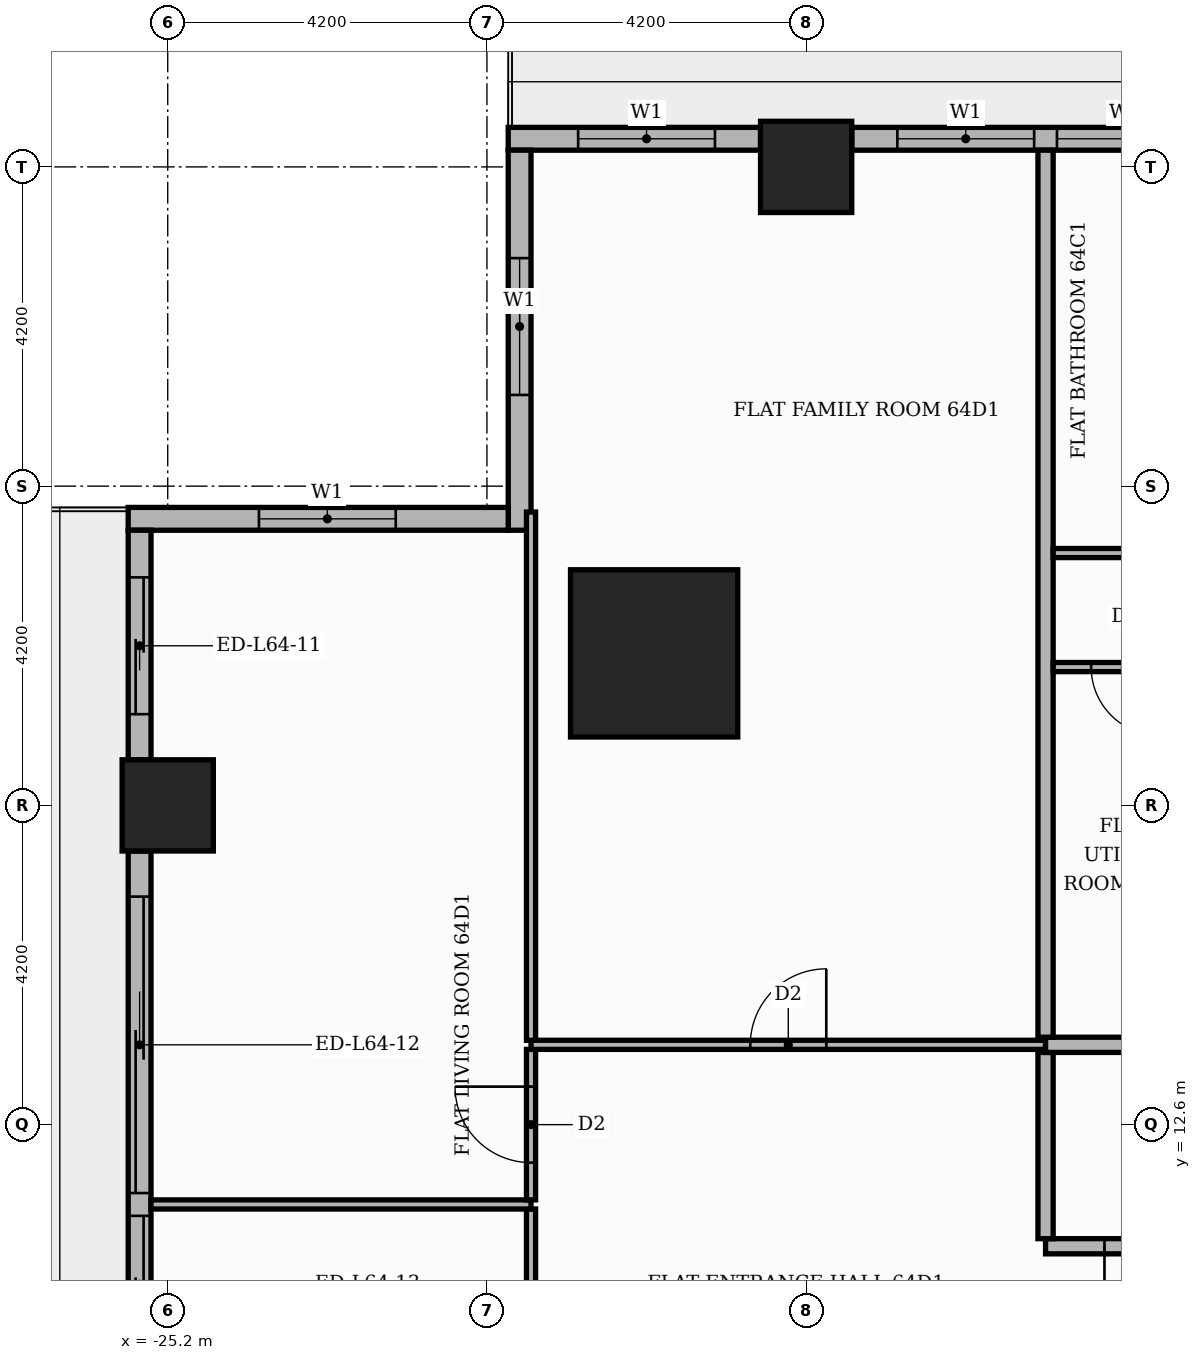
"""IFC4 building model, lengths in metres.
Left out: names, types, materials, properties, quantities, classifications, styles, units other than length and angle.
Written with IfcOpenShell. Run it as: python <this file> out.ifc"""

import sys

from ifc_helpers import new_model, si_unit, direction, frame, frame_2d, origin, origin_2d, place, context, subcontext, project, spatial, rectangle, extrude, element, fill, save


model = new_model("IFC4")
c1 = context("Model", 3, precision=1e-05, world=origin(), true_north=direction((0.0, 1.0)))
c2 = subcontext(c1, "Body", "Model", "MODEL_VIEW")
j1 = project(units=[si_unit("LENGTHUNIT", "METRE"), si_unit("PLANEANGLEUNIT", "RADIAN")], contexts=[c1])
p1 = place(None, origin())
s1 = spatial("IfcSite", under=j1, at=p1, CompositionType="ELEMENT")
p2 = place(p1, origin())
s2 = spatial("IfcBuilding", under=s1, at=p2, CompositionType="ELEMENT")
p3 = place(p2, frame((0.0, 0.0, 267.9)))
s3 = spatial("IfcBuildingStorey", under=s2, at=p3, CompositionType="ELEMENT", Elevation=267.9)
p4 = place(p3, frame((-18.8, 18.8, 0.0), z_axis=(0.0, 0.0, 1.0), x_axis=(1.0, 0.0, 0.0)))
e1 = element("IfcColumn", 1, at=p4, inside=s3, PredefinedType="COLUMN", context=c2, shape_type="SweptSolid", body=[
    extrude(rectangle(XDim=2.2, YDim=2.2, at=origin_2d()), origin(), (0.0, 0.0, 1.0), 3.9),
])
for number, where, z_axis, x_axis in (
    (2, (-16.8, 25.2, 0.0), (0.0, 0.0, 1.0), (1.0, 0.0, 0.0)),
    (3, (-25.2, 16.8, 0.0), (0.0, 0.0, 1.0), (1.0, 0.0, 0.0)),
):
    element("IfcColumn", number, at=place(p3, frame(where, z_axis=z_axis, x_axis=x_axis)), inside=s3, PredefinedType="COLUMN", context=c2, shape_type="SweptSolid", body=[
        extrude(rectangle(XDim=1.2, YDim=1.2, at=origin_2d()), origin(), (0.0, 0.0, 1.0), 3.9),
    ])
p5 = place(p3, frame((-9.0, 25.57, 0.0), z_axis=(0.0, 0.0, 1.0), x_axis=(-1.0, 0.0, 0.0)))
e4 = element("IfcWall", 4, at=p5, inside=s3, PredefinedType="STANDARD", context=c2, shape_type="SweptSolid", body=[
    extrude(rectangle(XDim=7.2, YDim=0.3, at=frame_2d((3.6, 0.0))), origin(), (0.0, 0.0, 1.0), 3.48),
])
p6 = place(p5, frame((0.6, 0.0, 0.9)))
e5 = element("IfcOpeningElement", 5, at=p6, cuts=e4, PredefinedType="OPENING", context=c2, shape_type="SweptSolid", body=[
    extrude(rectangle(XDim=1.8, YDim=2.1, at=frame_2d((0.9, 1.05))), frame((0.0, 0.16, 0.0), z_axis=(0.0, -1.0, 0.0), x_axis=(1.0, 0.0, 0.0)), (0.0, 0.0, 1.0), 0.32),
])
p7 = place(p5, frame((2.7, 0.0, 0.9)))
e6 = element("IfcOpeningElement", 6, at=p7, cuts=e4, PredefinedType="OPENING", context=c2, shape_type="SweptSolid", body=[
    extrude(rectangle(XDim=1.8, YDim=2.1, at=frame_2d((0.9, 1.05))), frame((0.0, 0.16, 0.0), z_axis=(0.0, -1.0, 0.0), x_axis=(1.0, 0.0, 0.0)), (0.0, 0.0, 1.0), 0.32),
])
p8 = place(p5, frame((4.8, 0.0, 0.9)))
e7 = element("IfcOpeningElement", 7, at=p8, cuts=e4, PredefinedType="OPENING", context=c2, shape_type="SweptSolid", body=[
    extrude(rectangle(XDim=1.8, YDim=2.1, at=frame_2d((0.9, 1.05))), frame((0.0, 0.16, 0.0), z_axis=(0.0, -1.0, 0.0), x_axis=(1.0, 0.0, 0.0)), (0.0, 0.0, 1.0), 0.32),
])
p9 = place(p3, frame((-17.4, 25.57, 0.0), z_axis=(0.0, 0.0, 1.0), x_axis=(-1.0, 0.0, 0.0)))
e8 = element("IfcWall", 8, at=p9, inside=s3, PredefinedType="STANDARD", context=c2, shape_type="SweptSolid", body=[
    extrude(rectangle(XDim=3.32, YDim=0.3, at=frame_2d((1.66, 0.0))), origin(), (0.0, 0.0, 1.0), 3.48),
])
p10 = place(p9, frame((0.6, 0.0, 0.9)))
e9 = element("IfcOpeningElement", 9, at=p10, cuts=e8, PredefinedType="OPENING", context=c2, shape_type="SweptSolid", body=[
    extrude(rectangle(XDim=1.8, YDim=2.1, at=frame_2d((0.9, 1.05))), frame((0.0, 0.16, 0.0), z_axis=(0.0, -1.0, 0.0), x_axis=(1.0, 0.0, 0.0)), (0.0, 0.0, 1.0), 0.32),
])
p11 = place(p3, frame((-20.57, 25.42, 0.0), z_axis=(0.0, 0.0, 1.0), x_axis=(0.0, -1.0, 0.0)))
e10 = element("IfcWall", 10, at=p11, inside=s3, PredefinedType="STANDARD", context=c2, shape_type="SweptSolid", body=[
    extrude(rectangle(XDim=5.0, YDim=0.3, at=frame_2d((2.5, 0.0))), origin(), (0.0, 0.0, 1.0), 3.48),
])
p12 = place(p11, frame((1.42, 0.0, 0.9)))
e11 = element("IfcOpeningElement", 11, at=p12, cuts=e10, PredefinedType="OPENING", context=c2, shape_type="SweptSolid", body=[
    extrude(rectangle(XDim=1.8, YDim=2.1, at=frame_2d((0.9, 1.05))), frame((0.0, 0.16, 0.0), z_axis=(0.0, -1.0, 0.0), x_axis=(1.0, 0.0, 0.0)), (0.0, 0.0, 1.0), 0.32),
])
p13 = place(p3, frame((-20.72, 20.57, 0.0), z_axis=(0.0, 0.0, 1.0), x_axis=(-1.0, 0.0, 0.0)))
e12 = element("IfcWall", 12, at=p13, inside=s3, PredefinedType="STANDARD", context=c2, shape_type="SweptSolid", body=[
    extrude(rectangle(XDim=5.0, YDim=0.3, at=frame_2d((2.5, 0.0))), origin(), (0.0, 0.0, 1.0), 3.48),
])
p14 = place(p13, frame((1.48, 0.0, 0.9)))
e13 = element("IfcOpeningElement", 13, at=p14, cuts=e12, PredefinedType="OPENING", context=c2, shape_type="SweptSolid", body=[
    extrude(rectangle(XDim=1.8, YDim=2.1, at=frame_2d((0.9, 1.05))), frame((0.0, 0.16, 0.0), z_axis=(0.0, -1.0, 0.0), x_axis=(1.0, 0.0, 0.0)), (0.0, 0.0, 1.0), 0.32),
])
p15 = place(p3, frame((-25.57, 20.42, 0.0), z_axis=(0.0, 0.0, 1.0), x_axis=(0.0, -1.0, 0.0)))
e14 = element("IfcWall", 14, at=p15, inside=s3, PredefinedType="STANDARD", context=c2, shape_type="SweptSolid", body=[
    extrude(rectangle(XDim=3.02, YDim=0.3, at=frame_2d((1.51, 0.0))), origin(), (0.0, 0.0, 1.0), 3.48),
])
p16 = place(p15, frame((0.62, 0.0, 0.0)))
e15 = element("IfcOpeningElement", 15, at=p16, cuts=e14, PredefinedType="OPENING", context=c2, shape_type="SweptSolid", body=[
    extrude(rectangle(XDim=1.8, YDim=2.4, at=frame_2d((0.9, 1.2))), frame((0.0, 0.16, 0.0), z_axis=(0.0, -1.0, 0.0), x_axis=(1.0, 0.0, 0.0)), (0.0, 0.0, 1.0), 0.32),
])
p17 = place(p3, frame((-25.57, 16.2, 0.0), z_axis=(0.0, 0.0, 1.0), x_axis=(0.0, -1.0, 0.0)))
e16 = element("IfcWall", 16, at=p17, inside=s3, PredefinedType="STANDARD", context=c2, shape_type="SweptSolid", body=[
    extrude(rectangle(XDim=7.2, YDim=0.3, at=frame_2d((3.6, 0.0))), origin(), (0.0, 0.0, 1.0), 3.48),
])
p18 = place(p17, frame((0.6, 0.0, 0.0)))
e17 = element("IfcOpeningElement", 17, at=p18, cuts=e16, PredefinedType="OPENING", context=c2, shape_type="SweptSolid", body=[
    extrude(rectangle(XDim=3.9, YDim=2.4, at=frame_2d((1.95, 1.2))), frame((0.0, 0.16, 0.0), z_axis=(0.0, -1.0, 0.0), x_axis=(1.0, 0.0, 0.0)), (0.0, 0.0, 1.0), 0.32),
])
p19 = place(p17, frame((4.8, 0.0, 0.0)))
e18 = element("IfcOpeningElement", 18, at=p19, cuts=e16, PredefinedType="OPENING", context=c2, shape_type="SweptSolid", body=[
    extrude(rectangle(XDim=1.8, YDim=2.4, at=frame_2d((0.9, 1.2))), frame((0.0, 0.16, 0.0), z_axis=(0.0, -1.0, 0.0), x_axis=(1.0, 0.0, 0.0)), (0.0, 0.0, 1.0), 0.32),
])
p20 = place(p3, frame((-20.42, 3.21, 0.0), z_axis=(0.0, 0.0, 1.0), x_axis=(0.0, 1.0, 0.0)))
e19 = element("IfcWall", 19, at=p20, inside=s3, PredefinedType="PARTITIONING", context=c2, shape_type="SweptSolid", body=[
    extrude(rectangle(XDim=8.28, YDim=0.12, at=frame_2d((4.14, 0.0))), origin(), (0.0, 0.0, 1.0), 3.48),
])
p21 = place(p20, frame((3.69, 0.0, 0.0)))
e20 = element("IfcOpeningElement", 20, at=p21, cuts=e19, PredefinedType="OPENING", context=c2, shape_type="SweptSolid", body=[
    extrude(rectangle(XDim=0.9, YDim=2.1, at=frame_2d((0.45, 1.05))), frame((0.0, 0.07, 0.0), z_axis=(0.0, -1.0, 0.0), x_axis=(1.0, 0.0, 0.0)), (0.0, 0.0, 1.0), 0.14),
])
p22 = place(p3, frame((-13.65, 11.0, 0.0), z_axis=(0.0, 0.0, 1.0), x_axis=(1.0, 0.0, 0.0)))
e21 = element("IfcWall", 21, at=p22, inside=s3, PredefinedType="PARTITIONING", context=c2, shape_type="SweptSolid", body=[
    extrude(rectangle(XDim=2.65, YDim=0.2, at=frame_2d((1.325, 0.0))), origin(), (0.0, 0.0, 1.0), 3.48),
])
p23 = place(p22, frame((0.775, 0.0, 0.0)))
e22 = element("IfcOpeningElement", 22, at=p23, cuts=e21, PredefinedType="OPENING", context=c2, shape_type="SweptSolid", body=[
    extrude(rectangle(XDim=1.1, YDim=2.4, at=frame_2d((0.55, 1.2))), frame((0.0, 0.11, 0.0), z_axis=(0.0, -1.0, 0.0), x_axis=(1.0, 0.0, 0.0)), (0.0, 0.0, 1.0), 0.22),
])
p24 = place(p3, frame((-13.65, 11.1, 0.0), z_axis=(0.0, 0.0, 1.0), x_axis=(0.0, 1.0, 0.0)))
e23 = element("IfcWall", 23, at=p24, inside=s3, PredefinedType="PARTITIONING", context=c2, shape_type="SweptSolid", body=[
    extrude(rectangle(XDim=2.45, YDim=0.2, at=frame_2d((1.225, 0.0))), origin(), (0.0, 0.0, 1.0), 3.48),
])
p25 = place(p3, frame((-25.42, 11.55, 0.0), z_axis=(0.0, 0.0, 1.0), x_axis=(1.0, 0.0, 0.0)))
e24 = element("IfcWall", 24, at=p25, inside=s3, PredefinedType="PARTITIONING", context=c2, shape_type="SweptSolid", body=[
    extrude(rectangle(XDim=5.0, YDim=0.12, at=frame_2d((2.5, 0.0))), origin(), (0.0, 0.0, 1.0), 3.48),
])
p26 = place(p3, frame((-20.42, 11.61, 0.0), z_axis=(0.0, 0.0, 1.0), x_axis=(0.0, 1.0, 0.0)))
e25 = element("IfcWall", 25, at=p26, inside=s3, PredefinedType="PARTITIONING", context=c2, shape_type="SweptSolid", body=[
    extrude(rectangle(XDim=1.98, YDim=0.12, at=frame_2d((0.99, 0.0))), origin(), (0.0, 0.0, 1.0), 3.48),
])
p27 = place(p26, frame((0.49, 0.0, 0.0)))
e26 = element("IfcOpeningElement", 26, at=p27, cuts=e25, PredefinedType="OPENING", context=c2, shape_type="SweptSolid", body=[
    extrude(rectangle(XDim=1.0, YDim=2.1, at=frame_2d((0.5, 1.05))), frame((0.0, 0.07, 0.0), z_axis=(0.0, -1.0, 0.0), x_axis=(1.0, 0.0, 0.0)), (0.0, 0.0, 1.0), 0.14),
])
p28 = place(p3, frame((-20.42, 13.65, 0.0), z_axis=(0.0, 0.0, 1.0), x_axis=(1.0, 0.0, 0.0)))
e27 = element("IfcWall", 27, at=p28, inside=s3, PredefinedType="PARTITIONING", context=c2, shape_type="SweptSolid", body=[
    extrude(rectangle(XDim=6.77, YDim=0.12, at=frame_2d((3.385, 0.0))), origin(), (0.0, 0.0, 1.0), 3.48),
])
p29 = place(p28, frame((2.885, 0.0, 0.0)))
e28 = element("IfcOpeningElement", 28, at=p29, cuts=e27, PredefinedType="OPENING", context=c2, shape_type="SweptSolid", body=[
    extrude(rectangle(XDim=1.0, YDim=2.1, at=frame_2d((0.5, 1.05))), frame((0.0, 0.07, 0.0), z_axis=(0.0, -1.0, 0.0), x_axis=(1.0, 0.0, 0.0)), (0.0, 0.0, 1.0), 0.14),
])
p30 = place(p3, frame((-13.65, 13.65, 0.0), z_axis=(0.0, 0.0, 1.0), x_axis=(1.0, 0.0, 0.0)))
e29 = element("IfcWall", 29, at=p30, inside=s3, PredefinedType="PARTITIONING", context=c2, shape_type="SweptSolid", body=[
    extrude(rectangle(XDim=39.07, YDim=0.2, at=frame_2d((19.535, 0.0))), origin(), (0.0, 0.0, 1.0), 3.48),
])
p31 = place(p30, frame((24.65, 0.0, 0.0)))
e30 = element("IfcOpeningElement", 30, at=p31, cuts=e29, PredefinedType="OPENING", context=c2, shape_type="SweptSolid", body=[
    extrude(rectangle(XDim=1.1, YDim=2.4, at=frame_2d((0.55, 1.2))), frame((0.0, 0.11, 0.0), z_axis=(0.0, -1.0, 0.0), x_axis=(1.0, 0.0, 0.0)), (0.0, 0.0, 1.0), 0.22),
])
p32 = place(p3, frame((-20.42, 13.71, 0.0), z_axis=(0.0, 0.0, 1.0), x_axis=(0.0, 1.0, 0.0)))
e31 = element("IfcWall", 31, at=p32, inside=s3, PredefinedType="PARTITIONING", context=c2, shape_type="SweptSolid", body=[
    extrude(rectangle(XDim=6.949, YDim=0.12, at=frame_2d((3.475, 0.0))), origin(), (0.0, 0.0, 1.0), 3.48),
])
p33 = place(p3, frame((-13.65, 13.75, 0.0), z_axis=(0.0, 0.0, 1.0), x_axis=(0.0, 1.0, 0.0)))
e32 = element("IfcWall", 32, at=p33, inside=s3, PredefinedType="PARTITIONING", context=c2, shape_type="SweptSolid", body=[
    extrude(rectangle(XDim=11.67, YDim=0.2, at=frame_2d((5.835, 0.0))), origin(), (0.0, 0.0, 1.0), 3.48),
])
p34 = place(p3, frame((-13.55, 18.62, 0.0), z_axis=(0.0, 0.0, 1.0), x_axis=(1.0, 0.0, 0.0)))
e33 = element("IfcWall", 33, at=p34, inside=s3, PredefinedType="PARTITIONING", context=c2, shape_type="SweptSolid", body=[
    extrude(rectangle(XDim=23.0, YDim=0.12, at=frame_2d((11.5, 0.0))), origin(), (0.0, 0.0, 1.0), 3.48),
])
p35 = place(p34, frame((19.25, 0.0, 0.0)))
e34 = element("IfcOpeningElement", 34, at=p35, cuts=e33, PredefinedType="OPENING", context=c2, shape_type="SweptSolid", body=[
    extrude(rectangle(XDim=0.9, YDim=2.1, at=frame_2d((0.45, 1.05))), frame((0.0, 0.07, 0.0), z_axis=(0.0, -1.0, 0.0), x_axis=(1.0, 0.0, 0.0)), (0.0, 0.0, 1.0), 0.14),
])
p36 = place(p34, frame((14.0, 0.0, 0.0)))
e35 = element("IfcOpeningElement", 35, at=p36, cuts=e33, PredefinedType="OPENING", context=c2, shape_type="SweptSolid", body=[
    extrude(rectangle(XDim=0.9, YDim=2.1, at=frame_2d((0.45, 1.05))), frame((0.0, 0.07, 0.0), z_axis=(0.0, -1.0, 0.0), x_axis=(1.0, 0.0, 0.0)), (0.0, 0.0, 1.0), 0.14),
])
p37 = place(p34, frame((11.15, 0.0, 0.0)))
e36 = element("IfcOpeningElement", 36, at=p37, cuts=e33, PredefinedType="OPENING", context=c2, shape_type="SweptSolid", body=[
    extrude(rectangle(XDim=0.9, YDim=2.1, at=frame_2d((0.45, 1.05))), frame((0.0, 0.07, 0.0), z_axis=(0.0, -1.0, 0.0), x_axis=(1.0, 0.0, 0.0)), (0.0, 0.0, 1.0), 0.14),
])
p38 = place(p34, frame((6.95, 0.0, 0.0)))
e37 = element("IfcOpeningElement", 37, at=p38, cuts=e33, PredefinedType="OPENING", context=c2, shape_type="SweptSolid", body=[
    extrude(rectangle(XDim=0.9, YDim=2.1, at=frame_2d((0.45, 1.05))), frame((0.0, 0.07, 0.0), z_axis=(0.0, -1.0, 0.0), x_axis=(1.0, 0.0, 0.0)), (0.0, 0.0, 1.0), 0.14),
])
p39 = place(p34, frame((2.6, 0.0, 0.0)))
e38 = element("IfcOpeningElement", 38, at=p39, cuts=e33, PredefinedType="OPENING", context=c2, shape_type="SweptSolid", body=[
    extrude(rectangle(XDim=0.9, YDim=2.1, at=frame_2d((0.45, 1.05))), frame((0.0, 0.07, 0.0), z_axis=(0.0, -1.0, 0.0), x_axis=(1.0, 0.0, 0.0)), (0.0, 0.0, 1.0), 0.14),
])
p40 = place(p34, frame((0.5, 0.0, 0.0)))
e39 = element("IfcOpeningElement", 39, at=p40, cuts=e33, PredefinedType="OPENING", context=c2, shape_type="SweptSolid", body=[
    extrude(rectangle(XDim=0.9, YDim=2.1, at=frame_2d((0.45, 1.05))), frame((0.0, 0.07, 0.0), z_axis=(0.0, -1.0, 0.0), x_axis=(1.0, 0.0, 0.0)), (0.0, 0.0, 1.0), 0.14),
])
p41 = place(p3, frame((-13.55, 20.12, 0.0), z_axis=(0.0, 0.0, 1.0), x_axis=(1.0, 0.0, 0.0)))
e40 = element("IfcWall", 40, at=p41, inside=s3, PredefinedType="PARTITIONING", context=c2, shape_type="SweptSolid", body=[
    extrude(rectangle(XDim=34.269, YDim=0.12, at=frame_2d((17.135, 0.0))), origin(), (0.0, 0.0, 1.0), 3.48),
])
p42 = place(p41, frame((27.75, 0.0, 0.0)))
e41 = element("IfcOpeningElement", 41, at=p42, cuts=e40, PredefinedType="OPENING", context=c2, shape_type="SweptSolid", body=[
    extrude(rectangle(XDim=1.0, YDim=2.1, at=frame_2d((0.5, 1.05))), frame((0.0, 0.07, 0.0), z_axis=(0.0, -1.0, 0.0), x_axis=(1.0, 0.0, 0.0)), (0.0, 0.0, 1.0), 0.14),
])
p43 = place(p41, frame((22.5, 0.0, 0.0)))
e42 = element("IfcOpeningElement", 42, at=p43, cuts=e40, PredefinedType="OPENING", context=c2, shape_type="SweptSolid", body=[
    extrude(rectangle(XDim=1.0, YDim=2.1, at=frame_2d((0.5, 1.05))), frame((0.0, 0.07, 0.0), z_axis=(0.0, -1.0, 0.0), x_axis=(1.0, 0.0, 0.0)), (0.0, 0.0, 1.0), 0.14),
])
p44 = place(p41, frame((14.15, 0.0, 0.0)))
e43 = element("IfcOpeningElement", 43, at=p44, cuts=e40, PredefinedType="OPENING", context=c2, shape_type="SweptSolid", body=[
    extrude(rectangle(XDim=0.9, YDim=2.1, at=frame_2d((0.45, 1.05))), frame((0.0, 0.07, 0.0), z_axis=(0.0, -1.0, 0.0), x_axis=(1.0, 0.0, 0.0)), (0.0, 0.0, 1.0), 0.14),
])
p45 = place(p41, frame((3.65, 0.0, 0.0)))
e44 = element("IfcOpeningElement", 44, at=p45, cuts=e40, PredefinedType="OPENING", context=c2, shape_type="SweptSolid", body=[
    extrude(rectangle(XDim=0.9, YDim=2.1, at=frame_2d((0.45, 1.05))), frame((0.0, 0.07, 0.0), z_axis=(0.0, -1.0, 0.0), x_axis=(1.0, 0.0, 0.0)), (0.0, 0.0, 1.0), 0.14),
])
p46 = place(p7, origin())
e45 = element("IfcWindow", 45, at=p46, inside=s3, PartitioningType="SINGLE_PANEL", PredefinedType="WINDOW", context=c2, shape_type="SweptSolid", body=[
    extrude(rectangle(XDim=1.8, YDim=2.1, at=frame_2d((0.9, 1.05))), frame((0.0, 0.03, 0.0), z_axis=(0.0, -1.0, 0.0), x_axis=(1.0, 0.0, 0.0)), (0.0, 0.0, 1.0), 0.06),
])
fill(e6, e45)
p47 = place(p8, origin())
e46 = element("IfcWindow", 46, at=p47, inside=s3, PartitioningType="SINGLE_PANEL", PredefinedType="WINDOW", context=c2, shape_type="SweptSolid", body=[
    extrude(rectangle(XDim=1.8, YDim=2.1, at=frame_2d((0.9, 1.05))), frame((0.0, 0.03, 0.0), z_axis=(0.0, -1.0, 0.0), x_axis=(1.0, 0.0, 0.0)), (0.0, 0.0, 1.0), 0.06),
])
fill(e7, e46)
p48 = place(p10, origin())
e47 = element("IfcWindow", 47, at=p48, inside=s3, PartitioningType="SINGLE_PANEL", PredefinedType="WINDOW", context=c2, shape_type="SweptSolid", body=[
    extrude(rectangle(XDim=1.8, YDim=2.1, at=frame_2d((0.9, 1.05))), frame((0.0, 0.03, 0.0), z_axis=(0.0, -1.0, 0.0), x_axis=(1.0, 0.0, 0.0)), (0.0, 0.0, 1.0), 0.06),
])
fill(e9, e47)
p49 = place(p12, origin())
e48 = element("IfcWindow", 48, at=p49, inside=s3, PartitioningType="SINGLE_PANEL", PredefinedType="WINDOW", context=c2, shape_type="SweptSolid", body=[
    extrude(rectangle(XDim=1.8, YDim=2.1, at=frame_2d((0.9, 1.05))), frame((0.0, 0.03, 0.0), z_axis=(0.0, -1.0, 0.0), x_axis=(1.0, 0.0, 0.0)), (0.0, 0.0, 1.0), 0.06),
])
fill(e11, e48)
p50 = place(p14, origin())
e49 = element("IfcWindow", 49, at=p50, inside=s3, PartitioningType="SINGLE_PANEL", PredefinedType="WINDOW", context=c2, shape_type="SweptSolid", body=[
    extrude(rectangle(XDim=1.8, YDim=2.1, at=frame_2d((0.9, 1.05))), frame((0.0, 0.03, 0.0), z_axis=(0.0, -1.0, 0.0), x_axis=(1.0, 0.0, 0.0)), (0.0, 0.0, 1.0), 0.06),
])
fill(e13, e49)
p51 = place(p16, origin())
e50 = element("IfcDoor", 50, at=p51, inside=s3, OperationType="SLIDING_TO_RIGHT", PredefinedType="DOOR", context=c2, shape_type="SweptSolid", body=[
    extrude(rectangle(XDim=1.8, YDim=2.4, at=frame_2d((0.9, 1.2))), frame((0.0, 0.025, 0.0), z_axis=(0.0, -1.0, 0.0), x_axis=(1.0, 0.0, 0.0)), (0.0, 0.0, 1.0), 0.05),
])
fill(e15, e50)
p52 = place(p18, origin())
e51 = element("IfcDoor", 51, at=p52, inside=s3, OperationType="SLIDING_TO_LEFT", PredefinedType="DOOR", context=c2, shape_type="SweptSolid", body=[
    extrude(rectangle(XDim=3.9, YDim=2.4, at=frame_2d((1.95, 1.2))), frame((0.0, 0.025, 0.0), z_axis=(0.0, -1.0, 0.0), x_axis=(1.0, 0.0, 0.0)), (0.0, 0.0, 1.0), 0.05),
])
fill(e17, e51)
p53 = place(p19, origin())
e52 = element("IfcDoor", 52, at=p53, inside=s3, OperationType="SLIDING_TO_RIGHT", PredefinedType="DOOR", context=c2, shape_type="SweptSolid", body=[
    extrude(rectangle(XDim=1.8, YDim=2.4, at=frame_2d((0.9, 1.2))), frame((0.0, 0.025, 0.0), z_axis=(0.0, -1.0, 0.0), x_axis=(1.0, 0.0, 0.0)), (0.0, 0.0, 1.0), 0.05),
])
fill(e18, e52)
p54 = place(p40, frame((0.9, 0.0, 0.0), z_axis=(0.0, 0.0, 1.0), x_axis=(-1.0, 0.0, 0.0)))
e53 = element("IfcDoor", 53, at=p54, inside=s3, OperationType="SINGLE_SWING_RIGHT", PredefinedType="DOOR", context=c2, shape_type="SweptSolid", body=[
    extrude(rectangle(XDim=0.9, YDim=2.1, at=frame_2d((0.45, 1.05))), frame((0.0, 0.025, 0.0), z_axis=(0.0, -1.0, 0.0), x_axis=(1.0, 0.0, 0.0)), (0.0, 0.0, 1.0), 0.05),
])
fill(e39, e53)
p55 = place(p23, frame((1.1, 0.0, 0.0), z_axis=(0.0, 0.0, 1.0), x_axis=(-1.0, 0.0, 0.0)))
e54 = element("IfcDoor", 54, at=p55, inside=s3, OperationType="SINGLE_SWING_LEFT", PredefinedType="DOOR", context=c2, shape_type="SweptSolid", body=[
    extrude(rectangle(XDim=1.1, YDim=2.4, at=frame_2d((0.55, 1.2))), frame((0.0, 0.025, 0.0), z_axis=(0.0, -1.0, 0.0), x_axis=(1.0, 0.0, 0.0)), (0.0, 0.0, 1.0), 0.05),
])
fill(e22, e54)
p56 = place(p29, origin())
e55 = element("IfcDoor", 55, at=p56, inside=s3, OperationType="SINGLE_SWING_RIGHT", PredefinedType="DOOR", context=c2, shape_type="SweptSolid", body=[
    extrude(rectangle(XDim=1.0, YDim=2.1, at=frame_2d((0.5, 1.05))), frame((0.0, 0.025, 0.0), z_axis=(0.0, -1.0, 0.0), x_axis=(1.0, 0.0, 0.0)), (0.0, 0.0, 1.0), 0.05),
])
fill(e28, e55)
p57 = place(p27, origin())
e56 = element("IfcDoor", 56, at=p57, inside=s3, OperationType="SINGLE_SWING_RIGHT", PredefinedType="DOOR", context=c2, shape_type="SweptSolid", body=[
    extrude(rectangle(XDim=1.0, YDim=2.1, at=frame_2d((0.5, 1.05))), frame((0.0, 0.025, 0.0), z_axis=(0.0, -1.0, 0.0), x_axis=(1.0, 0.0, 0.0)), (0.0, 0.0, 1.0), 0.05),
])
fill(e26, e56)
save(model, sys.argv[1])
